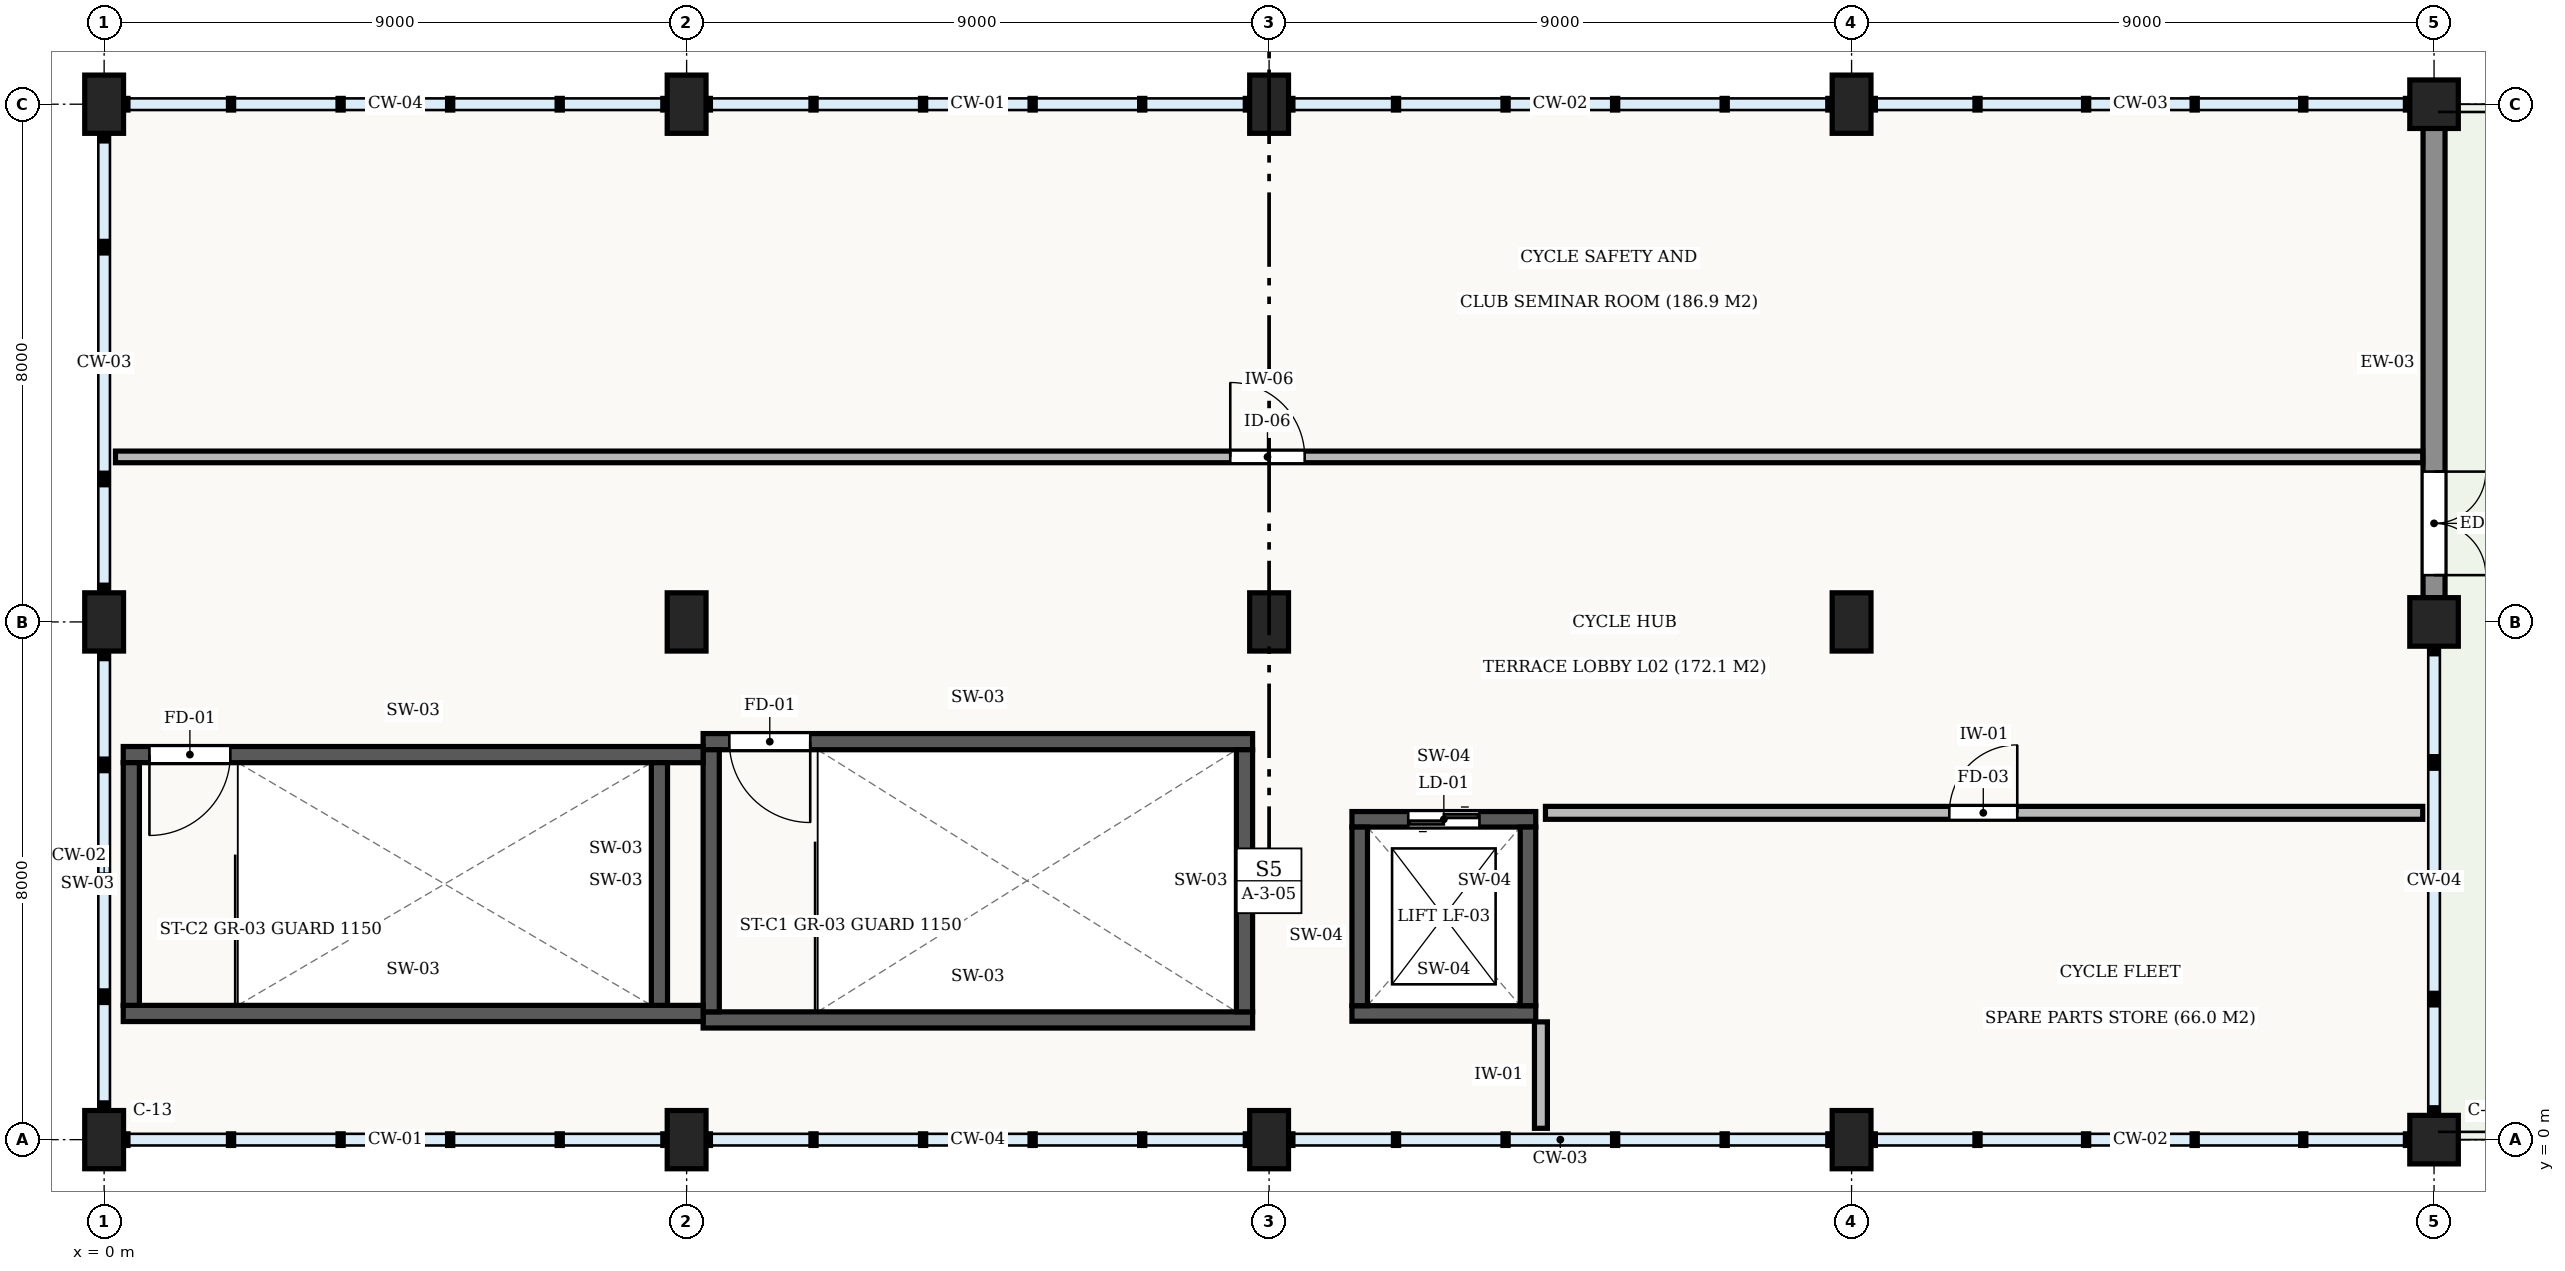
"""IFC4 building model, lengths in metres.
Left out: names, types, materials, properties, quantities, classifications, styles, units other than length and angle.
Written with IfcOpenShell. Run it as: python <this file> out.ifc"""

import sys

from ifc_helpers import new_model, si_unit, direction, frame, frame_2d, origin, origin_2d, place, context, subcontext, project, spatial, rectangle, extrude, element, fill, save


model = new_model("IFC4")
c1 = context("Model", 3, precision=1e-05, world=origin(), true_north=direction((0.0, 1.0)))
c2 = subcontext(c1, "Body", "Model", "MODEL_VIEW")
j1 = project(units=[si_unit("LENGTHUNIT", "METRE"), si_unit("PLANEANGLEUNIT", "RADIAN")], contexts=[c1])
p1 = place(None, origin())
s1 = spatial("IfcSite", under=j1, at=p1, CompositionType="ELEMENT")
p2 = place(p1, origin())
s2 = spatial("IfcBuilding", under=s1, at=p2, CompositionType="ELEMENT")
p3 = place(p2, frame((0.0, 0.0, 10.2)))
s3 = spatial("IfcBuildingStorey", under=s2, at=p3, CompositionType="ELEMENT", Elevation=10.2)
for number, where, z_axis, x_axis in (
    (1, (0.0, 0.0, 0.0), (0.0, 0.0, 1.0), (1.0, 0.0, 0.0)),
    (2, (0.0, 8.0, 0.0), (0.0, 0.0, 1.0), (1.0, 0.0, 0.0)),
    (3, (0.0, 16.0, 0.0), (0.0, 0.0, 1.0), (1.0, 0.0, 0.0)),
    (4, (9.0, 0.0, 0.0), (0.0, 0.0, 1.0), (1.0, 0.0, 0.0)),
    (5, (9.0, 8.0, 0.0), (0.0, 0.0, 1.0), (1.0, 0.0, 0.0)),
    (6, (9.0, 16.0, 0.0), (0.0, 0.0, 1.0), (1.0, 0.0, 0.0)),
    (7, (18.0, 0.0, 0.0), (0.0, 0.0, 1.0), (1.0, 0.0, 0.0)),
    (8, (18.0, 8.0, 0.0), (0.0, 0.0, 1.0), (1.0, 0.0, 0.0)),
    (9, (18.0, 16.0, 0.0), (0.0, 0.0, 1.0), (1.0, 0.0, 0.0)),
    (10, (27.0, 0.0, 0.0), (0.0, 0.0, 1.0), (1.0, 0.0, 0.0)),
    (11, (27.0, 8.0, 0.0), (0.0, 0.0, 1.0), (1.0, 0.0, 0.0)),
    (12, (27.0, 16.0, 0.0), (0.0, 0.0, 1.0), (1.0, 0.0, 0.0)),
):
    element("IfcColumn", number, at=place(p3, frame(where, z_axis=z_axis, x_axis=x_axis)), inside=s3, PredefinedType="COLUMN", context=c2, shape_type="SweptSolid", body=[
        extrude(rectangle(XDim=0.6, YDim=0.9, at=origin_2d()), origin(), (0.0, 0.0, 1.0), 4.2),
    ])
for number, where, z_axis, x_axis in (
    (13, (36.0, 0.0, 0.0), (0.0, 0.0, 1.0), (1.0, 0.0, 0.0)),
    (14, (36.0, 8.0, 0.0), (0.0, 0.0, 1.0), (1.0, 0.0, 0.0)),
    (15, (36.0, 16.0, 0.0), (0.0, 0.0, 1.0), (1.0, 0.0, 0.0)),
):
    element("IfcColumn", number, at=place(p3, frame(where, z_axis=z_axis, x_axis=x_axis)), inside=s3, PredefinedType="COLUMN", context=c2, shape_type="SweptSolid", body=[
        extrude(rectangle(XDim=0.75, YDim=0.75, at=origin_2d()), origin(), (0.0, 0.0, 1.0), 4.2),
    ])
p4 = place(p3, frame((36.0, 15.627, 0.0), z_axis=(0.0, 0.0, 1.0), x_axis=(0.0, -1.0, 0.0)))
e16 = element("IfcWall", 16, at=p4, inside=s3, PredefinedType="STANDARD", context=c2, shape_type="SweptSolid", body=[
    extrude(rectangle(XDim=7.254, YDim=0.34, at=frame_2d((3.627, 0.0))), origin(), (0.0, 0.0, 1.0), 3.34),
])
p5 = place(p4, frame((5.304, 0.0, 0.0)))
e17 = element("IfcOpeningElement", 17, at=p5, cuts=e16, PredefinedType="OPENING", context=c2, shape_type="SweptSolid", body=[
    extrude(rectangle(XDim=1.6, YDim=2.3, at=frame_2d((0.8, 1.15))), frame((0.0, 0.182, 0.0), z_axis=(0.0, -1.0, 0.0), x_axis=(1.0, 0.0, 0.0)), (0.0, 0.0, 1.0), 0.364),
])
p6 = place(p3, frame((9.255, 1.85, 0.0), z_axis=(0.0, 0.0, 1.0), x_axis=(1.0, 0.0, 0.0)))
e18 = element("IfcWall", 18, at=p6, inside=s3, PredefinedType="SHEAR", context=c2, shape_type="SweptSolid", body=[
    extrude(rectangle(XDim=8.49, YDim=0.25, at=frame_2d((4.245, 0.0))), origin(), (0.0, 0.0, 1.0), 3.89),
])
p7 = place(p3, frame((17.745, 6.15, 0.0), z_axis=(0.0, 0.0, 1.0), x_axis=(-1.0, 0.0, 0.0)))
e19 = element("IfcWall", 19, at=p7, inside=s3, PredefinedType="SHEAR", context=c2, shape_type="SweptSolid", body=[
    extrude(rectangle(XDim=8.49, YDim=0.25, at=frame_2d((4.245, 0.0))), origin(), (0.0, 0.0, 1.0), 3.89),
])
p8 = place(p7, frame((6.835, 0.0, 0.0)))
e20 = element("IfcOpeningElement", 20, at=p8, cuts=e19, PredefinedType="OPENING", context=c2, shape_type="SweptSolid", body=[
    extrude(rectangle(XDim=1.25, YDim=2.15, at=frame_2d((0.625, 1.075))), frame((0.0, 0.137, 0.0), z_axis=(0.0, -1.0, 0.0), x_axis=(1.0, 0.0, 0.0)), (0.0, 0.0, 1.0), 0.274),
])
for number, where, z_axis, x_axis in (
    (21, (9.38, 6.025, 0.0), (0.0, 0.0, 1.0), (0.0, -1.0, 0.0)),
    (22, (17.62, 1.975, 0.0), (0.0, 0.0, 1.0), (0.0, 1.0, 0.0)),
):
    element("IfcWall", number, at=place(p3, frame(where, z_axis=z_axis, x_axis=x_axis)), inside=s3, PredefinedType="SHEAR", context=c2, shape_type="SweptSolid", body=[
        extrude(rectangle(XDim=4.05, YDim=0.25, at=frame_2d((2.025, 0.0))), origin(), (0.0, 0.0, 1.0), 3.89),
    ])
p9 = place(p3, frame((0.295, 1.95, 0.0), z_axis=(0.0, 0.0, 1.0), x_axis=(1.0, 0.0, 0.0)))
e23 = element("IfcWall", 23, at=p9, inside=s3, PredefinedType="SHEAR", context=c2, shape_type="SweptSolid", body=[
    extrude(rectangle(XDim=8.96, YDim=0.25, at=frame_2d((4.48, 0.0))), origin(), (0.0, 0.0, 1.0), 3.89),
])
p10 = place(p3, frame((9.255, 5.95, 0.0), z_axis=(0.0, 0.0, 1.0), x_axis=(-1.0, 0.0, 0.0)))
e24 = element("IfcWall", 24, at=p10, inside=s3, PredefinedType="SHEAR", context=c2, shape_type="SweptSolid", body=[
    extrude(rectangle(XDim=8.96, YDim=0.25, at=frame_2d((4.48, 0.0))), origin(), (0.0, 0.0, 1.0), 3.89),
])
p11 = place(p10, frame((7.305, 0.0, 0.0)))
e25 = element("IfcOpeningElement", 25, at=p11, cuts=e24, PredefinedType="OPENING", context=c2, shape_type="SweptSolid", body=[
    extrude(rectangle(XDim=1.25, YDim=2.15, at=frame_2d((0.625, 1.075))), frame((0.0, 0.137, 0.0), z_axis=(0.0, -1.0, 0.0), x_axis=(1.0, 0.0, 0.0)), (0.0, 0.0, 1.0), 0.274),
])
for number, where, z_axis, x_axis in (
    (26, (0.42, 5.825, 0.0), (0.0, 0.0, 1.0), (0.0, -1.0, 0.0)),
    (27, (8.58, 2.075, 0.0), (0.0, 0.0, 1.0), (0.0, 1.0, 0.0)),
):
    element("IfcWall", number, at=place(p3, frame(where, z_axis=z_axis, x_axis=x_axis)), inside=s3, PredefinedType="SHEAR", context=c2, shape_type="SweptSolid", body=[
        extrude(rectangle(XDim=3.75, YDim=0.25, at=frame_2d((1.875, 0.0))), origin(), (0.0, 0.0, 1.0), 3.89),
    ])
p12 = place(p3, frame((19.28, 1.95, 0.0), z_axis=(0.0, 0.0, 1.0), x_axis=(1.0, 0.0, 0.0)))
e28 = element("IfcWall", 28, at=p12, inside=s3, PredefinedType="SHEAR", context=c2, shape_type="SweptSolid", body=[
    extrude(rectangle(XDim=2.84, YDim=0.24, at=frame_2d((1.42, 0.0))), origin(), (0.0, 0.0, 1.0), 3.89),
])
p13 = place(p3, frame((22.12, 4.95, 0.0), z_axis=(0.0, 0.0, 1.0), x_axis=(-1.0, 0.0, 0.0)))
e29 = element("IfcWall", 29, at=p13, inside=s3, PredefinedType="SHEAR", context=c2, shape_type="SweptSolid", body=[
    extrude(rectangle(XDim=2.84, YDim=0.24, at=frame_2d((1.42, 0.0))), origin(), (0.0, 0.0, 1.0), 3.89),
])
p14 = place(p13, frame((0.87, 0.0, 0.0)))
e30 = element("IfcOpeningElement", 30, at=p14, cuts=e29, PredefinedType="OPENING", context=c2, shape_type="SweptSolid", body=[
    extrude(rectangle(XDim=1.1, YDim=2.2, at=frame_2d((0.55, 1.1))), frame((0.0, 0.132, 0.0), z_axis=(0.0, -1.0, 0.0), x_axis=(1.0, 0.0, 0.0)), (0.0, 0.0, 1.0), 0.264),
])
for number, where, z_axis, x_axis in (
    (31, (19.4, 4.83, 0.0), (0.0, 0.0, 1.0), (0.0, -1.0, 0.0)),
    (32, (22.0, 2.07, 0.0), (0.0, 0.0, 1.0), (0.0, 1.0, 0.0)),
):
    element("IfcWall", number, at=place(p3, frame(where, z_axis=z_axis, x_axis=x_axis)), inside=s3, PredefinedType="SHEAR", context=c2, shape_type="SweptSolid", body=[
        extrude(rectangle(XDim=2.76, YDim=0.24, at=frame_2d((1.38, 0.0))), origin(), (0.0, 0.0, 1.0), 3.89),
    ])
p15 = place(p3, frame((0.175, 10.55, 0.0), z_axis=(0.0, 0.0, 1.0), x_axis=(1.0, 0.0, 0.0)))
e33 = element("IfcWall", 33, at=p15, inside=s3, PredefinedType="STANDARD", context=c2, shape_type="SweptSolid", body=[
    extrude(rectangle(XDim=35.65, YDim=0.18, at=frame_2d((17.825, 0.0))), origin(), (0.0, 0.0, 1.0), 3.89),
])
p16 = place(p15, frame((17.225, 0.0, 0.0)))
e34 = element("IfcOpeningElement", 34, at=p16, cuts=e33, PredefinedType="OPENING", context=c2, shape_type="SweptSolid", body=[
    extrude(rectangle(XDim=1.15, YDim=2.15, at=frame_2d((0.575, 1.075))), frame((0.0, 0.102, 0.0), z_axis=(0.0, -1.0, 0.0), x_axis=(1.0, 0.0, 0.0)), (0.0, 0.0, 1.0), 0.204),
])
p17 = place(p3, frame((22.27, 5.05, 0.0), z_axis=(0.0, 0.0, 1.0), x_axis=(1.0, 0.0, 0.0)))
e35 = element("IfcWall", 35, at=p17, inside=s3, PredefinedType="STANDARD", context=c2, shape_type="SweptSolid", body=[
    extrude(rectangle(XDim=13.555, YDim=0.2, at=frame_2d((6.777, 0.0))), origin(), (0.0, 0.0, 1.0), 3.89),
])
p18 = place(p17, frame((6.24, 0.0, 0.0)))
e36 = element("IfcOpeningElement", 36, at=p18, cuts=e35, PredefinedType="OPENING", context=c2, shape_type="SweptSolid", body=[
    extrude(rectangle(XDim=1.05, YDim=2.15, at=frame_2d((0.525, 1.075))), frame((0.0, 0.112, 0.0), z_axis=(0.0, -1.0, 0.0), x_axis=(1.0, 0.0, 0.0)), (0.0, 0.0, 1.0), 0.224),
])
p19 = place(p3, frame((22.2, 0.175, 0.0), z_axis=(0.0, 0.0, 1.0), x_axis=(0.0, 1.0, 0.0)))
e37 = element("IfcWall", 37, at=p19, inside=s3, PredefinedType="STANDARD", context=c2, shape_type="SweptSolid", body=[
    extrude(rectangle(XDim=1.645, YDim=0.2, at=frame_2d((0.823, 0.0))), origin(), (0.0, 0.0, 1.0), 3.89),
])
p20 = place(p5, origin())
e38 = element("IfcDoor", 38, at=p20, inside=s3, OperationType="SINGLE_SWING_LEFT", PredefinedType="DOOR", context=c2, shape_type="SweptSolid", body=[
    extrude(rectangle(XDim=1.6, YDim=2.3, at=frame_2d((0.8, 1.15))), frame((0.0, 0.025, 0.0), z_axis=(0.0, -1.0, 0.0), x_axis=(1.0, 0.0, 0.0)), (0.0, 0.0, 1.0), 0.05),
])
fill(e17, e38)
p21 = place(p8, origin())
e39 = element("IfcDoor", 39, at=p21, inside=s3, OperationType="SINGLE_SWING_LEFT", PredefinedType="DOOR", context=c2, shape_type="SweptSolid", body=[
    extrude(rectangle(XDim=1.25, YDim=2.15, at=frame_2d((0.625, 1.075))), frame((0.0, 0.025, 0.0), z_axis=(0.0, -1.0, 0.0), x_axis=(1.0, 0.0, 0.0)), (0.0, 0.0, 1.0), 0.05),
])
fill(e20, e39)
p22 = place(p11, origin())
e40 = element("IfcDoor", 40, at=p22, inside=s3, OperationType="SINGLE_SWING_RIGHT", PredefinedType="DOOR", context=c2, shape_type="SweptSolid", body=[
    extrude(rectangle(XDim=1.25, YDim=2.15, at=frame_2d((0.625, 1.075))), frame((0.0, 0.025, 0.0), z_axis=(0.0, -1.0, 0.0), x_axis=(1.0, 0.0, 0.0)), (0.0, 0.0, 1.0), 0.05),
])
fill(e25, e40)
p23 = place(p14, origin())
e41 = element("IfcDoor", 41, at=p23, inside=s3, OperationType="DOUBLE_DOOR_SLIDING", PredefinedType="DOOR", context=c2, shape_type="SweptSolid", body=[
    extrude(rectangle(XDim=1.1, YDim=2.2, at=frame_2d((0.55, 1.1))), frame((0.0, 0.025, 0.0), z_axis=(0.0, -1.0, 0.0), x_axis=(1.0, 0.0, 0.0)), (0.0, 0.0, 1.0), 0.05),
])
fill(e30, e41)
p24 = place(p16, origin())
e42 = element("IfcDoor", 42, at=p24, inside=s3, OperationType="SINGLE_SWING_LEFT", PredefinedType="DOOR", context=c2, shape_type="SweptSolid", body=[
    extrude(rectangle(XDim=1.15, YDim=2.15, at=frame_2d((0.575, 1.075))), frame((0.0, 0.025, 0.0), z_axis=(0.0, -1.0, 0.0), x_axis=(1.0, 0.0, 0.0)), (0.0, 0.0, 1.0), 0.05),
])
fill(e34, e42)
p25 = place(p18, origin())
e43 = element("IfcDoor", 43, at=p25, inside=s3, OperationType="SINGLE_SWING_RIGHT", PredefinedType="DOOR", context=c2, shape_type="SweptSolid", body=[
    extrude(rectangle(XDim=1.05, YDim=2.15, at=frame_2d((0.525, 1.075))), frame((0.0, 0.025, 0.0), z_axis=(0.0, -1.0, 0.0), x_axis=(1.0, 0.0, 0.0)), (0.0, 0.0, 1.0), 0.05),
])
fill(e36, e43)
save(model, sys.argv[1])
